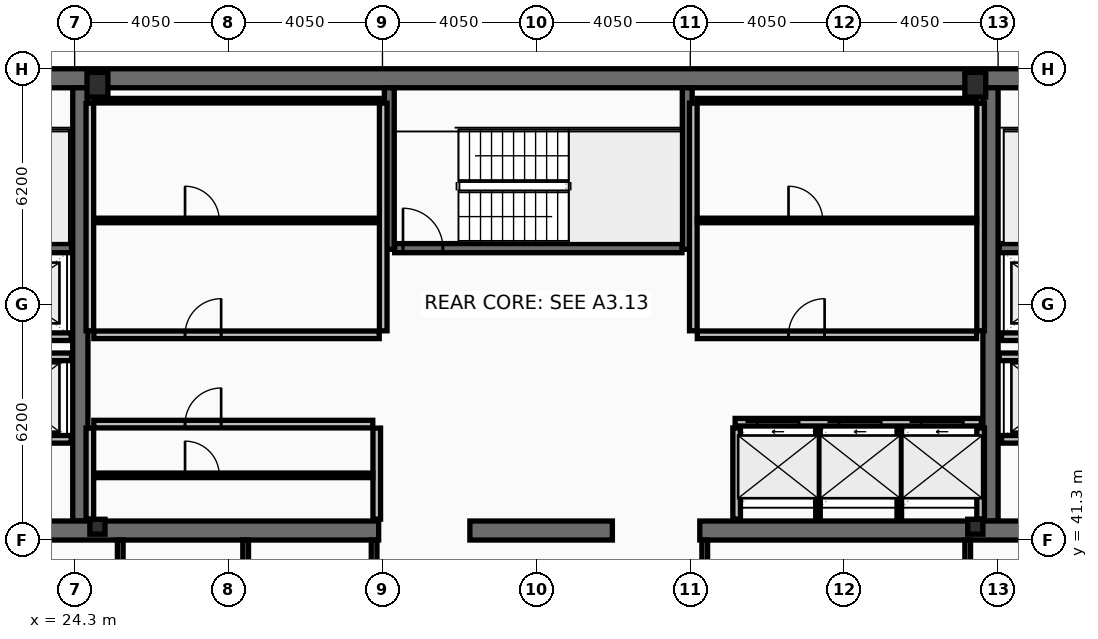
"""IFC4 building model, lengths in metres.
Left out: names, types, materials, properties, quantities, classifications, styles, units other than length and angle.
Written with IfcOpenShell. Run it as: python <this file> out.ifc"""

import sys

from ifc_helpers import new_model, si_unit, direction, frame, frame_2d, origin, origin_2d, place, context, subcontext, project, spatial, rectangle, hollow_rectangle, i_section, extrude, element, fill, save


model = new_model("IFC4")
c1 = context("Model", 3, precision=1e-05, world=origin(), true_north=direction((0.0, 1.0)))
c2 = subcontext(c1, "Body", "Model", "MODEL_VIEW")
j1 = project(units=[si_unit("LENGTHUNIT", "METRE"), si_unit("PLANEANGLEUNIT", "RADIAN")], contexts=[c1])
p1 = place(None, origin())
s1 = spatial("IfcSite", under=j1, at=p1, CompositionType="ELEMENT")
p2 = place(p1, origin())
s2 = spatial("IfcBuilding", under=s1, at=p2, CompositionType="ELEMENT")
p3 = place(p2, frame((0.0, 0.0, 332.6)))
s3 = spatial("IfcBuildingStorey", under=s2, at=p3, CompositionType="ELEMENT", Elevation=332.6)
p4 = place(p3, frame((16.2, 53.45, 0.0), z_axis=(0.0, 0.0, 1.0), x_axis=(1.0, 0.0, 0.0)))
e1 = element("IfcWall", 1, at=p4, inside=s3, PredefinedType="SHEAR", context=c2, shape_type="SweptSolid", body=[
    extrude(rectangle(XDim=40.5, YDim=0.5, at=frame_2d((20.25, 0.0))), origin(), (0.0, 0.0, 1.0), 3.44),
])
for number, where, z_axis, x_axis in (
    (2, (24.45, 41.8, 0.0), (0.0, 0.0, 1.0), (0.0, 1.0, 0.0)),
    (3, (48.4, 41.8, 0.0), (0.0, 0.0, 1.0), (0.0, 1.0, 0.0)),
):
    element("IfcWall", number, at=place(p3, frame(where, z_axis=z_axis, x_axis=x_axis)), inside=s3, PredefinedType="SHEAR", context=c2, shape_type="SweptSolid", body=[
        extrude(rectangle(XDim=11.4, YDim=0.4, at=frame_2d((5.7, 0.0))), origin(), (0.0, 0.0, 1.0), 3.44),
    ])
p5 = place(p3, frame((32.3, 41.55, 0.0), z_axis=(0.0, 0.0, 1.0), x_axis=(-1.0, 0.0, 0.0)))
e4 = element("IfcWall", 4, at=p5, inside=s3, PredefinedType="SHEAR", context=c2, shape_type="SweptSolid", body=[
    extrude(rectangle(XDim=11.45, YDim=0.5, at=frame_2d((5.725, 0.0))), origin(), (0.0, 0.0, 1.0), 3.44),
])
p6 = place(p3, frame((38.45, 41.55, 0.0), z_axis=(0.0, 0.0, 1.0), x_axis=(-1.0, 0.0, 0.0)))
e5 = element("IfcWall", 5, at=p6, inside=s3, PredefinedType="SHEAR", context=c2, shape_type="SweptSolid", body=[
    extrude(rectangle(XDim=3.75, YDim=0.5, at=frame_2d((1.875, 0.0))), origin(), (0.0, 0.0, 1.0), 3.44),
])
p7 = place(p3, frame((52.05, 41.55, 0.0), z_axis=(0.0, 0.0, 1.0), x_axis=(-1.0, 0.0, 0.0)))
e6 = element("IfcWall", 6, at=p7, inside=s3, PredefinedType="SHEAR", context=c2, shape_type="SweptSolid", body=[
    extrude(rectangle(XDim=11.3, YDim=0.5, at=frame_2d((5.65, 0.0))), origin(), (0.0, 0.0, 1.0), 3.44),
])
for number, where, z_axis, x_axis in (
    (7, (32.58, 48.95, 0.0), (0.0, 0.0, 1.0), (0.0, 1.0, 0.0)),
    (8, (40.42, 48.95, 0.0), (0.0, 0.0, 1.0), (0.0, 1.0, 0.0)),
):
    element("IfcWall", number, at=place(p3, frame(where, z_axis=z_axis, x_axis=x_axis)), inside=s3, PredefinedType="SHEAR", context=c2, shape_type="SweptSolid", body=[
        extrude(rectangle(XDim=4.25, YDim=0.26, at=frame_2d((2.125, 0.0))), origin(), (0.0, 0.0, 1.0), 3.44),
    ])
p8 = place(p3, frame((16.7, 48.98, 0.0), z_axis=(0.0, 0.0, 1.0), x_axis=(1.0, 0.0, 0.0)))
e9 = element("IfcWall", 9, at=p8, inside=s3, PredefinedType="SHEAR", context=c2, shape_type="SweptSolid", body=[
    extrude(rectangle(XDim=7.52, YDim=0.24, at=frame_2d((3.76, 0.0))), origin(), (0.0, 0.0, 1.0), 3.44),
])
p9 = place(p8, frame((0.22, 0.0, 0.0)))
e10 = element("IfcOpeningElement", 10, at=p9, cuts=e9, PredefinedType="OPENING", context=c2, shape_type="SweptSolid", body=[
    extrude(rectangle(XDim=1.05, YDim=2.15, at=frame_2d((0.525, 1.075))), frame((0.0, 0.13, 0.0), z_axis=(0.0, -1.0, 0.0), x_axis=(1.0, 0.0, 0.0)), (0.0, 0.0, 1.0), 0.26),
])
p10 = place(p3, frame((48.63, 48.98, 0.0), z_axis=(0.0, 0.0, 1.0), x_axis=(1.0, 0.0, 0.0)))
e11 = element("IfcWall", 11, at=p10, inside=s3, PredefinedType="SHEAR", context=c2, shape_type="SweptSolid", body=[
    extrude(rectangle(XDim=7.57, YDim=0.24, at=frame_2d((3.785, 0.0))), origin(), (0.0, 0.0, 1.0), 3.44),
])
p11 = place(p10, frame((6.3, 0.0, 0.0)))
e12 = element("IfcOpeningElement", 12, at=p11, cuts=e11, PredefinedType="OPENING", context=c2, shape_type="SweptSolid", body=[
    extrude(rectangle(XDim=1.05, YDim=2.15, at=frame_2d((0.525, 1.075))), frame((0.0, 0.13, 0.0), z_axis=(0.0, -1.0, 0.0), x_axis=(1.0, 0.0, 0.0)), (0.0, 0.0, 1.0), 0.26),
])
p12 = place(p3, frame((32.72, 48.98, 0.0), z_axis=(0.0, 0.0, 1.0), x_axis=(1.0, 0.0, 0.0)))
e13 = element("IfcWall", 13, at=p12, inside=s3, PredefinedType="SHEAR", context=c2, shape_type="SweptSolid", body=[
    extrude(rectangle(XDim=7.56, YDim=0.24, at=frame_2d((3.78, 0.0))), origin(), (0.0, 0.0, 1.0), 3.44),
])
p13 = place(p12, frame((0.22, 0.0, 0.0)))
e14 = element("IfcOpeningElement", 14, at=p13, cuts=e13, PredefinedType="OPENING", context=c2, shape_type="SweptSolid", body=[
    extrude(rectangle(XDim=1.05, YDim=2.15, at=frame_2d((0.525, 1.075))), frame((0.0, 0.13, 0.0), z_axis=(0.0, -1.0, 0.0), x_axis=(1.0, 0.0, 0.0)), (0.0, 0.0, 1.0), 0.26),
])
for number, where, z_axis, x_axis in (
    (15, (24.9, 53.28, 0.0), (0.0, 0.0, 1.0), (1.0, 0.0, 0.0)),
    (16, (48.0, 53.28, 0.0), (0.0, 0.0, 1.0), (1.0, 0.0, 0.0)),
):
    element("IfcColumn", number, at=place(p3, frame(where, z_axis=z_axis, x_axis=x_axis)), inside=s3, PredefinedType="COLUMN", context=c2, shape_type="SweptSolid", body=[
        extrude(hollow_rectangle(XDim=0.55, YDim=0.65, WallThickness=0.04, at=origin_2d()), origin(), (0.0, 0.0, 1.0), 3.6),
    ])
for number, where, z_axis, x_axis in (
    (17, (24.9, 41.65, 0.0), (0.0, 0.0, 1.0), (1.0, 0.0, 0.0)),
    (18, (48.0, 41.65, 0.0), (0.0, 0.0, 1.0), (1.0, 0.0, 0.0)),
):
    element("IfcColumn", number, at=place(p3, frame(where, z_axis=z_axis, x_axis=x_axis)), inside=s3, PredefinedType="COLUMN", context=c2, shape_type="SweptSolid", body=[
        extrude(i_section(OverallWidth=0.399, OverallDepth=0.393, WebThickness=0.023, FlangeThickness=0.037, at=origin_2d()), origin(), (0.0, 0.0, 1.0), 3.6),
    ])
p14 = place(p3, frame((41.68, 44.4, 0.0), z_axis=(0.0, 0.0, 1.0), x_axis=(1.0, 0.0, 0.0)))
e19 = element("IfcWall", 19, at=p14, inside=s3, PredefinedType="PARTITIONING", context=c2, shape_type="SweptSolid", body=[
    extrude(rectangle(XDim=6.48, YDim=0.2, at=frame_2d((3.24, 0.0))), origin(), (0.0, 0.0, 1.0), 3.44),
])
p15 = place(p14, frame((0.58, 0.0, 0.0)))
e20 = element("IfcOpeningElement", 20, at=p15, cuts=e19, PredefinedType="OPENING", context=c2, shape_type="SweptSolid", body=[
    extrude(rectangle(XDim=1.1, YDim=2.18, at=frame_2d((0.55, 1.09))), frame((0.0, 0.11, 0.0), z_axis=(0.0, -1.0, 0.0), x_axis=(1.0, 0.0, 0.0)), (0.0, 0.0, 1.0), 0.22),
])
p16 = place(p14, frame((2.74, 0.0, 0.0)))
e21 = element("IfcOpeningElement", 21, at=p16, cuts=e19, PredefinedType="OPENING", context=c2, shape_type="SweptSolid", body=[
    extrude(rectangle(XDim=1.1, YDim=2.18, at=frame_2d((0.55, 1.09))), frame((0.0, 0.11, 0.0), z_axis=(0.0, -1.0, 0.0), x_axis=(1.0, 0.0, 0.0)), (0.0, 0.0, 1.0), 0.22),
])
p17 = place(p14, frame((4.9, 0.0, 0.0)))
e22 = element("IfcOpeningElement", 22, at=p17, cuts=e19, PredefinedType="OPENING", context=c2, shape_type="SweptSolid", body=[
    extrude(rectangle(XDim=1.1, YDim=2.18, at=frame_2d((0.55, 1.09))), frame((0.0, 0.11, 0.0), z_axis=(0.0, -1.0, 0.0), x_axis=(1.0, 0.0, 0.0)), (0.0, 0.0, 1.0), 0.22),
])
p18 = place(p3, frame((51.61, 43.95, 0.0), z_axis=(0.0, 0.0, 1.0), x_axis=(-1.0, 0.0, 0.0)))
e23 = element("IfcWall", 23, at=p18, inside=s3, PredefinedType="PARTITIONING", context=c2, shape_type="SweptSolid", body=[
    extrude(rectangle(XDim=2.92, YDim=0.2, at=frame_2d((1.46, 0.0))), origin(), (0.0, 0.0, 1.0), 3.44),
])
p19 = place(p18, frame((0.81, 0.0, 0.0)))
e24 = element("IfcOpeningElement", 24, at=p19, cuts=e23, PredefinedType="OPENING", context=c2, shape_type="SweptSolid", body=[
    extrude(rectangle(XDim=1.3, YDim=2.18, at=frame_2d((0.65, 1.09))), frame((0.0, 0.11, 0.0), z_axis=(0.0, -1.0, 0.0), x_axis=(1.0, 0.0, 0.0)), (0.0, 0.0, 1.0), 0.22),
])
p20 = place(p3, frame((24.21, 43.95, 0.0), z_axis=(0.0, 0.0, 1.0), x_axis=(-1.0, 0.0, 0.0)))
e25 = element("IfcWall", 25, at=p20, inside=s3, PredefinedType="PARTITIONING", context=c2, shape_type="SweptSolid", body=[
    extrude(rectangle(XDim=2.97, YDim=0.2, at=frame_2d((1.485, 0.0))), origin(), (0.0, 0.0, 1.0), 3.44),
])
p21 = place(p20, frame((0.86, 0.0, 0.0)))
e26 = element("IfcOpeningElement", 26, at=p21, cuts=e25, PredefinedType="OPENING", context=c2, shape_type="SweptSolid", body=[
    extrude(rectangle(XDim=1.3, YDim=2.18, at=frame_2d((0.65, 1.09))), frame((0.0, 0.11, 0.0), z_axis=(0.0, -1.0, 0.0), x_axis=(1.0, 0.0, 0.0)), (0.0, 0.0, 1.0), 0.22),
])
p22 = place(p3, frame((51.61, 46.65, 0.0), z_axis=(0.0, 0.0, 1.0), x_axis=(-1.0, 0.0, 0.0)))
e27 = element("IfcWall", 27, at=p22, inside=s3, PredefinedType="PARTITIONING", context=c2, shape_type="SweptSolid", body=[
    extrude(rectangle(XDim=2.92, YDim=0.2, at=frame_2d((1.46, 0.0))), origin(), (0.0, 0.0, 1.0), 3.44),
])
p23 = place(p22, frame((0.86, 0.0, 0.0)))
e28 = element("IfcOpeningElement", 28, at=p23, cuts=e27, PredefinedType="OPENING", context=c2, shape_type="SweptSolid", body=[
    extrude(rectangle(XDim=1.2, YDim=2.18, at=frame_2d((0.6, 1.09))), frame((0.0, 0.11, 0.0), z_axis=(0.0, -1.0, 0.0), x_axis=(1.0, 0.0, 0.0)), (0.0, 0.0, 1.0), 0.22),
])
p24 = place(p3, frame((24.21, 46.65, 0.0), z_axis=(0.0, 0.0, 1.0), x_axis=(-1.0, 0.0, 0.0)))
e29 = element("IfcWall", 29, at=p24, inside=s3, PredefinedType="PARTITIONING", context=c2, shape_type="SweptSolid", body=[
    extrude(rectangle(XDim=2.97, YDim=0.2, at=frame_2d((1.485, 0.0))), origin(), (0.0, 0.0, 1.0), 3.44),
])
p25 = place(p24, frame((0.91, 0.0, 0.0)))
e30 = element("IfcOpeningElement", 30, at=p25, cuts=e29, PredefinedType="OPENING", context=c2, shape_type="SweptSolid", body=[
    extrude(rectangle(XDim=1.2, YDim=2.18, at=frame_2d((0.6, 1.09))), frame((0.0, 0.11, 0.0), z_axis=(0.0, -1.0, 0.0), x_axis=(1.0, 0.0, 0.0)), (0.0, 0.0, 1.0), 0.22),
])
p26 = place(p3, frame((21.2, 46.12, 0.0), z_axis=(0.0, 0.0, 1.0), x_axis=(1.0, 0.0, 0.0)))
e31 = element("IfcWall", 31, at=p26, inside=s3, PredefinedType="PARTITIONING", context=c2, shape_type="SweptSolid", body=[
    extrude(rectangle(XDim=3.02, YDim=0.2, at=frame_2d((1.51, 0.0))), origin(), (0.0, 0.0, 1.0), 3.44),
])
p27 = place(p3, frame((48.63, 46.12, 0.0), z_axis=(0.0, 0.0, 1.0), x_axis=(1.0, 0.0, 0.0)))
e32 = element("IfcWall", 32, at=p27, inside=s3, PredefinedType="PARTITIONING", context=c2, shape_type="SweptSolid", body=[
    extrude(rectangle(XDim=3.07, YDim=0.2, at=frame_2d((1.535, 0.0))), origin(), (0.0, 0.0, 1.0), 3.44),
])
for number, where, z_axis, x_axis in (
    (33, (24.7, 46.805, 0.0), (0.0, 0.0, 1.0), (0.0, 1.0, 0.0)),
    (34, (32.42, 46.805, 0.0), (0.0, 0.0, 1.0), (0.0, 1.0, 0.0)),
):
    element("IfcWall", number, at=place(p3, frame(where, z_axis=z_axis, x_axis=x_axis)), inside=s3, PredefinedType="PARTITIONING", context=c2, shape_type="SweptSolid", body=[
        extrude(rectangle(XDim=5.99, YDim=0.2, at=frame_2d((2.995, 0.0))), origin(), (0.0, 0.0, 1.0), 3.44),
    ])
p28 = place(p3, frame((24.805, 52.86, 0.0), z_axis=(0.0, 0.0, 1.0), x_axis=(1.0, 0.0, 0.0)))
e35 = element("IfcWall", 35, at=p28, inside=s3, PredefinedType="PARTITIONING", context=c2, shape_type="SweptSolid", body=[
    extrude(rectangle(XDim=7.51, YDim=0.12, at=frame_2d((3.755, 0.0))), origin(), (0.0, 0.0, 1.0), 3.44),
])
p29 = place(p3, frame((24.805, 49.709, 0.0), z_axis=(0.0, 0.0, 1.0), x_axis=(1.0, 0.0, 0.0)))
e36 = element("IfcWall", 36, at=p29, inside=s3, PredefinedType="PARTITIONING", context=c2, shape_type="SweptSolid", body=[
    extrude(rectangle(XDim=7.51, YDim=0.12, at=frame_2d((3.755, 0.0))), origin(), (0.0, 0.0, 1.0), 3.44),
])
p30 = place(p29, frame((2.4, 0.0, 0.0)))
e37 = element("IfcOpeningElement", 37, at=p30, cuts=e36, PredefinedType="OPENING", context=c2, shape_type="SweptSolid", body=[
    extrude(rectangle(XDim=0.9, YDim=2.05, at=frame_2d((0.45, 1.025))), frame((0.0, 0.07, 0.0), z_axis=(0.0, -1.0, 0.0), x_axis=(1.0, 0.0, 0.0)), (0.0, 0.0, 1.0), 0.14),
])
p31 = place(p3, frame((24.805, 46.7, 0.0), z_axis=(0.0, 0.0, 1.0), x_axis=(1.0, 0.0, 0.0)))
e38 = element("IfcWall", 38, at=p31, inside=s3, PredefinedType="PARTITIONING", context=c2, shape_type="SweptSolid", body=[
    extrude(rectangle(XDim=7.51, YDim=0.2, at=frame_2d((3.755, 0.0))), origin(), (0.0, 0.0, 1.0), 3.44),
])
p32 = place(p31, frame((2.4, 0.0, 0.0)))
e39 = element("IfcOpeningElement", 39, at=p32, cuts=e38, PredefinedType="OPENING", context=c2, shape_type="SweptSolid", body=[
    extrude(rectangle(XDim=0.95, YDim=2.1, at=frame_2d((0.475, 1.05))), frame((0.0, 0.11, 0.0), z_axis=(0.0, -1.0, 0.0), x_axis=(1.0, 0.0, 0.0)), (0.0, 0.0, 1.0), 0.22),
])
for number, where, z_axis, x_axis in (
    (40, (24.7, 41.85, 0.0), (0.0, 0.0, 1.0), (0.0, 1.0, 0.0)),
    (41, (32.25, 41.85, 0.0), (0.0, 0.0, 1.0), (0.0, 1.0, 0.0)),
):
    element("IfcWall", number, at=place(p3, frame(where, z_axis=z_axis, x_axis=x_axis)), inside=s3, PredefinedType="PARTITIONING", context=c2, shape_type="SweptSolid", body=[
        extrude(rectangle(XDim=2.395, YDim=0.2, at=frame_2d((1.198, 0.0))), origin(), (0.0, 0.0, 1.0), 3.44),
    ])
p33 = place(p3, frame((24.805, 43.002, 0.0), z_axis=(0.0, 0.0, 1.0), x_axis=(1.0, 0.0, 0.0)))
e42 = element("IfcWall", 42, at=p33, inside=s3, PredefinedType="PARTITIONING", context=c2, shape_type="SweptSolid", body=[
    extrude(rectangle(XDim=7.34, YDim=0.12, at=frame_2d((3.67, 0.0))), origin(), (0.0, 0.0, 1.0), 3.44),
])
p34 = place(p33, frame((2.4, 0.0, 0.0)))
e43 = element("IfcOpeningElement", 43, at=p34, cuts=e42, PredefinedType="OPENING", context=c2, shape_type="SweptSolid", body=[
    extrude(rectangle(XDim=0.9, YDim=2.05, at=frame_2d((0.45, 1.025))), frame((0.0, 0.07, 0.0), z_axis=(0.0, -1.0, 0.0), x_axis=(1.0, 0.0, 0.0)), (0.0, 0.0, 1.0), 0.14),
])
p35 = place(p3, frame((24.805, 44.35, 0.0), z_axis=(0.0, 0.0, 1.0), x_axis=(1.0, 0.0, 0.0)))
e44 = element("IfcWall", 44, at=p35, inside=s3, PredefinedType="PARTITIONING", context=c2, shape_type="SweptSolid", body=[
    extrude(rectangle(XDim=7.34, YDim=0.2, at=frame_2d((3.67, 0.0))), origin(), (0.0, 0.0, 1.0), 3.44),
])
p36 = place(p35, frame((2.4, 0.0, 0.0)))
e45 = element("IfcOpeningElement", 45, at=p36, cuts=e44, PredefinedType="OPENING", context=c2, shape_type="SweptSolid", body=[
    extrude(rectangle(XDim=0.95, YDim=2.1, at=frame_2d((0.475, 1.05))), frame((0.0, 0.11, 0.0), z_axis=(0.0, -1.0, 0.0), x_axis=(1.0, 0.0, 0.0)), (0.0, 0.0, 1.0), 0.22),
])
for number, where, z_axis, x_axis in (
    (46, (40.58, 46.805, 0.0), (0.0, 0.0, 1.0), (0.0, 1.0, 0.0)),
    (47, (48.14, 46.805, 0.0), (0.0, 0.0, 1.0), (0.0, 1.0, 0.0)),
):
    element("IfcWall", number, at=place(p3, frame(where, z_axis=z_axis, x_axis=x_axis)), inside=s3, PredefinedType="PARTITIONING", context=c2, shape_type="SweptSolid", body=[
        extrude(rectangle(XDim=5.99, YDim=0.2, at=frame_2d((2.995, 0.0))), origin(), (0.0, 0.0, 1.0), 3.44),
    ])
p37 = place(p3, frame((40.685, 52.86, 0.0), z_axis=(0.0, 0.0, 1.0), x_axis=(1.0, 0.0, 0.0)))
e48 = element("IfcWall", 48, at=p37, inside=s3, PredefinedType="PARTITIONING", context=c2, shape_type="SweptSolid", body=[
    extrude(rectangle(XDim=7.35, YDim=0.12, at=frame_2d((3.675, 0.0))), origin(), (0.0, 0.0, 1.0), 3.44),
])
p38 = place(p3, frame((40.685, 49.709, 0.0), z_axis=(0.0, 0.0, 1.0), x_axis=(1.0, 0.0, 0.0)))
e49 = element("IfcWall", 49, at=p38, inside=s3, PredefinedType="PARTITIONING", context=c2, shape_type="SweptSolid", body=[
    extrude(rectangle(XDim=7.35, YDim=0.12, at=frame_2d((3.675, 0.0))), origin(), (0.0, 0.0, 1.0), 3.44),
])
p39 = place(p38, frame((2.4, 0.0, 0.0)))
e50 = element("IfcOpeningElement", 50, at=p39, cuts=e49, PredefinedType="OPENING", context=c2, shape_type="SweptSolid", body=[
    extrude(rectangle(XDim=0.9, YDim=2.05, at=frame_2d((0.45, 1.025))), frame((0.0, 0.07, 0.0), z_axis=(0.0, -1.0, 0.0), x_axis=(1.0, 0.0, 0.0)), (0.0, 0.0, 1.0), 0.14),
])
p40 = place(p3, frame((40.685, 46.7, 0.0), z_axis=(0.0, 0.0, 1.0), x_axis=(1.0, 0.0, 0.0)))
e51 = element("IfcWall", 51, at=p40, inside=s3, PredefinedType="PARTITIONING", context=c2, shape_type="SweptSolid", body=[
    extrude(rectangle(XDim=7.35, YDim=0.2, at=frame_2d((3.675, 0.0))), origin(), (0.0, 0.0, 1.0), 3.44),
])
p41 = place(p40, frame((2.4, 0.0, 0.0)))
e52 = element("IfcOpeningElement", 52, at=p41, cuts=e51, PredefinedType="OPENING", context=c2, shape_type="SweptSolid", body=[
    extrude(rectangle(XDim=0.95, YDim=2.1, at=frame_2d((0.475, 1.05))), frame((0.0, 0.11, 0.0), z_axis=(0.0, -1.0, 0.0), x_axis=(1.0, 0.0, 0.0)), (0.0, 0.0, 1.0), 0.22),
])
for number, where, z_axis, x_axis in (
    (53, (41.72, 41.85, 0.0), (0.0, 0.0, 1.0), (0.0, 1.0, 0.0)),
    (54, (48.14, 41.85, 0.0), (0.0, 0.0, 1.0), (0.0, 1.0, 0.0)),
):
    element("IfcWall", number, at=place(p3, frame(where, z_axis=z_axis, x_axis=x_axis)), inside=s3, PredefinedType="PARTITIONING", context=c2, shape_type="SweptSolid", body=[
        extrude(rectangle(XDim=2.4, YDim=0.2, at=frame_2d((1.2, 0.0))), origin(), (0.0, 0.0, 1.0), 3.44),
    ])
for number, where, z_axis, x_axis in (
    (55, (43.86, 41.85, 0.0), (0.0, 0.0, 1.0), (0.0, 1.0, 0.0)),
    (56, (46.0, 41.85, 0.0), (0.0, 0.0, 1.0), (0.0, 1.0, 0.0)),
):
    element("IfcWall", number, at=place(p3, frame(where, z_axis=z_axis, x_axis=x_axis)), inside=s3, PredefinedType="PARTITIONING", context=c2, shape_type="SweptSolid", body=[
        extrude(rectangle(XDim=2.4, YDim=0.12, at=frame_2d((1.2, 0.0))), origin(), (0.0, 0.0, 1.0), 3.44),
    ])
for number, where, z_axis, x_axis in (
    (57, (25.5, 38.28, 0.0), (0.0, 0.0, 1.0), (0.0, 1.0, 0.0)),
    (58, (28.8, 38.28, 0.0), (0.0, 0.0, 1.0), (0.0, 1.0, 0.0)),
    (59, (32.18, 38.28, 0.0), (0.0, 0.0, 1.0), (0.0, 1.0, 0.0)),
    (60, (40.88, 38.28, 0.0), (0.0, 0.0, 1.0), (0.0, 1.0, 0.0)),
):
    element("IfcWall", number, at=place(p3, frame(where, z_axis=z_axis, x_axis=x_axis)), inside=s3, PredefinedType="PARTITIONING", context=c2, shape_type="SweptSolid", body=[
        extrude(rectangle(XDim=3.02, YDim=0.15, at=frame_2d((1.51, 0.0))), origin(), (0.0, 0.0, 1.0), 3.44),
    ])
p42 = place(p3, frame((47.8, 38.28, 0.0), z_axis=(0.0, 0.0, 1.0), x_axis=(0.0, 1.0, 0.0)))
e61 = element("IfcWall", 61, at=p42, inside=s3, PredefinedType="PARTITIONING", context=c2, shape_type="SweptSolid", body=[
    extrude(rectangle(XDim=3.02, YDim=0.15, at=frame_2d((1.51, 0.0))), origin(), (0.0, 0.0, 1.0), 2.83),
])
p43 = place(p13, origin())
e62 = element("IfcDoor", 62, at=p43, inside=s3, OperationType="SINGLE_SWING_LEFT", PredefinedType="DOOR", context=c2, shape_type="SweptSolid", body=[
    extrude(rectangle(XDim=1.05, YDim=2.15, at=frame_2d((0.525, 1.075))), frame((0.0, 0.025, 0.0), z_axis=(0.0, -1.0, 0.0), x_axis=(1.0, 0.0, 0.0)), (0.0, 0.0, 1.0), 0.05),
])
fill(e14, e62)
p44 = place(p15, origin())
e63 = element("IfcDoor", 63, at=p44, inside=s3, OperationType="SLIDING_TO_LEFT", PredefinedType="DOOR", context=c2, shape_type="SweptSolid", body=[
    extrude(rectangle(XDim=1.1, YDim=2.18, at=frame_2d((0.55, 1.09))), frame((0.0, 0.025, 0.0), z_axis=(0.0, -1.0, 0.0), x_axis=(1.0, 0.0, 0.0)), (0.0, 0.0, 1.0), 0.05),
])
fill(e20, e63)
p45 = place(p16, origin())
e64 = element("IfcDoor", 64, at=p45, inside=s3, OperationType="SLIDING_TO_LEFT", PredefinedType="DOOR", context=c2, shape_type="SweptSolid", body=[
    extrude(rectangle(XDim=1.1, YDim=2.18, at=frame_2d((0.55, 1.09))), frame((0.0, 0.025, 0.0), z_axis=(0.0, -1.0, 0.0), x_axis=(1.0, 0.0, 0.0)), (0.0, 0.0, 1.0), 0.05),
])
fill(e21, e64)
p46 = place(p17, origin())
e65 = element("IfcDoor", 65, at=p46, inside=s3, OperationType="SLIDING_TO_LEFT", PredefinedType="DOOR", context=c2, shape_type="SweptSolid", body=[
    extrude(rectangle(XDim=1.1, YDim=2.18, at=frame_2d((0.55, 1.09))), frame((0.0, 0.025, 0.0), z_axis=(0.0, -1.0, 0.0), x_axis=(1.0, 0.0, 0.0)), (0.0, 0.0, 1.0), 0.05),
])
fill(e22, e65)
p47 = place(p30, origin())
e66 = element("IfcDoor", 66, at=p47, inside=s3, OperationType="SINGLE_SWING_LEFT", PredefinedType="DOOR", context=c2, shape_type="SweptSolid", body=[
    extrude(rectangle(XDim=0.9, YDim=2.05, at=frame_2d((0.45, 1.025))), frame((0.0, 0.025, 0.0), z_axis=(0.0, -1.0, 0.0), x_axis=(1.0, 0.0, 0.0)), (0.0, 0.0, 1.0), 0.05),
])
fill(e37, e66)
p48 = place(p32, origin())
e67 = element("IfcDoor", 67, at=p48, inside=s3, OperationType="SINGLE_SWING_RIGHT", PredefinedType="DOOR", context=c2, shape_type="SweptSolid", body=[
    extrude(rectangle(XDim=0.95, YDim=2.1, at=frame_2d((0.475, 1.05))), frame((0.0, 0.025, 0.0), z_axis=(0.0, -1.0, 0.0), x_axis=(1.0, 0.0, 0.0)), (0.0, 0.0, 1.0), 0.05),
])
fill(e39, e67)
p49 = place(p34, origin())
e68 = element("IfcDoor", 68, at=p49, inside=s3, OperationType="SINGLE_SWING_LEFT", PredefinedType="DOOR", context=c2, shape_type="SweptSolid", body=[
    extrude(rectangle(XDim=0.9, YDim=2.05, at=frame_2d((0.45, 1.025))), frame((0.0, 0.025, 0.0), z_axis=(0.0, -1.0, 0.0), x_axis=(1.0, 0.0, 0.0)), (0.0, 0.0, 1.0), 0.05),
])
fill(e43, e68)
p50 = place(p36, origin())
e69 = element("IfcDoor", 69, at=p50, inside=s3, OperationType="SINGLE_SWING_RIGHT", PredefinedType="DOOR", context=c2, shape_type="SweptSolid", body=[
    extrude(rectangle(XDim=0.95, YDim=2.1, at=frame_2d((0.475, 1.05))), frame((0.0, 0.025, 0.0), z_axis=(0.0, -1.0, 0.0), x_axis=(1.0, 0.0, 0.0)), (0.0, 0.0, 1.0), 0.05),
])
fill(e45, e69)
p51 = place(p39, origin())
e70 = element("IfcDoor", 70, at=p51, inside=s3, OperationType="SINGLE_SWING_LEFT", PredefinedType="DOOR", context=c2, shape_type="SweptSolid", body=[
    extrude(rectangle(XDim=0.9, YDim=2.05, at=frame_2d((0.45, 1.025))), frame((0.0, 0.025, 0.0), z_axis=(0.0, -1.0, 0.0), x_axis=(1.0, 0.0, 0.0)), (0.0, 0.0, 1.0), 0.05),
])
fill(e50, e70)
p52 = place(p41, origin())
e71 = element("IfcDoor", 71, at=p52, inside=s3, OperationType="SINGLE_SWING_RIGHT", PredefinedType="DOOR", context=c2, shape_type="SweptSolid", body=[
    extrude(rectangle(XDim=0.95, YDim=2.1, at=frame_2d((0.475, 1.05))), frame((0.0, 0.025, 0.0), z_axis=(0.0, -1.0, 0.0), x_axis=(1.0, 0.0, 0.0)), (0.0, 0.0, 1.0), 0.05),
])
fill(e52, e71)
save(model, sys.argv[1])
